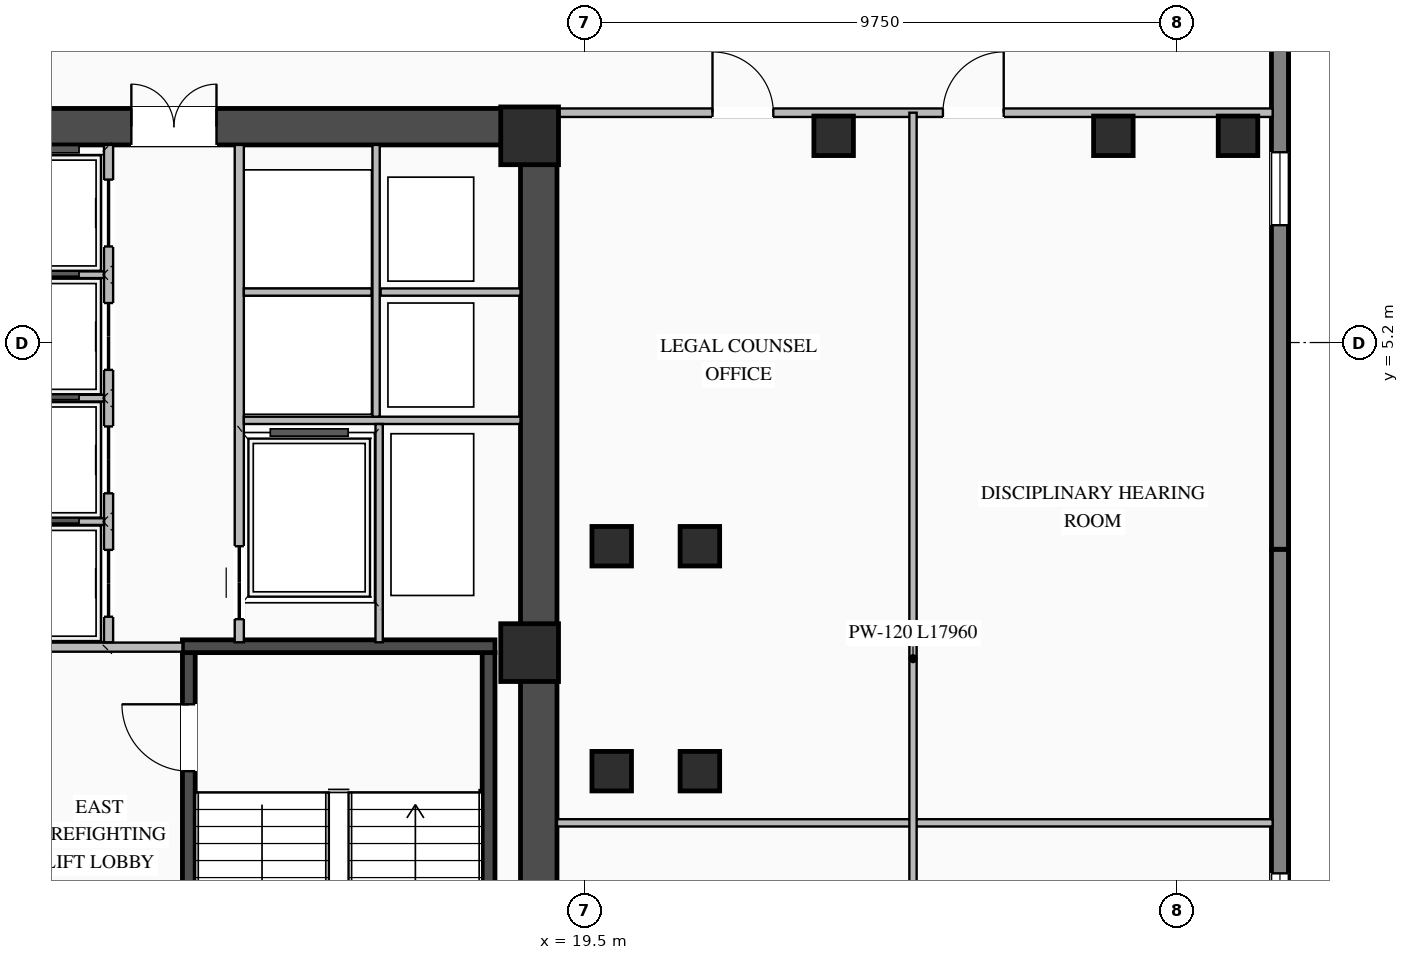
"""IFC4 building model, lengths in metres.
Left out: names, types, materials, properties, quantities, classifications, styles, units other than length and angle.
Written with IfcOpenShell. Run it as: python <this file> out.ifc"""

import sys

from ifc_helpers import new_model, si_unit, direction, frame, frame_2d, origin, origin_2d, place, context, subcontext, project, spatial, rectangle, i_section, extrude, element, fill, save


model = new_model("IFC4")
c1 = context("Model", 3, precision=1e-05, world=origin(), true_north=direction((0.0, 1.0)))
c2 = subcontext(c1, "Body", "Model", "MODEL_VIEW")
j1 = project(units=[si_unit("LENGTHUNIT", "METRE"), si_unit("PLANEANGLEUNIT", "RADIAN")], contexts=[c1])
p1 = place(None, origin())
s1 = spatial("IfcSite", under=j1, at=p1, CompositionType="ELEMENT")
p2 = place(p1, origin())
s2 = spatial("IfcBuilding", under=s1, at=p2, CompositionType="ELEMENT")
p3 = place(p2, frame((0.0, 0.0, 120.85)))
s3 = spatial("IfcBuildingStorey", under=s2, at=p3, CompositionType="ELEMENT", Elevation=120.85)
p4 = place(p3, frame((8.8, 8.75, 0.0), z_axis=(0.0, 0.0, 1.0), x_axis=(1.0, 0.0, 0.0)))
e1 = element("IfcWall", 1, at=p4, inside=s3, PredefinedType="SHEAR", context=c2, shape_type="SweptSolid", body=[
    extrude(rectangle(XDim=10.25, YDim=0.6, at=frame_2d((5.125, 0.0))), origin(), (0.0, 0.0, 1.0), 3.27),
])
p5 = place(p4, frame((3.25, 0.0, 0.0)))
e2 = element("IfcOpeningElement", 2, at=p5, cuts=e1, PredefinedType="OPENING", context=c2, shape_type="SweptSolid", body=[
    extrude(rectangle(XDim=1.4, YDim=2.05, at=frame_2d((0.7, 1.025))), frame((0.0, 0.31, 0.0), z_axis=(0.0, -1.0, 0.0), x_axis=(1.0, 0.0, 0.0)), (0.0, 0.0, 1.0), 0.62),
])
p6 = place(p3, frame((18.75, -8.45, 0.0), z_axis=(0.0, 0.0, 1.0), x_axis=(0.0, 1.0, 0.0)))
e3 = element("IfcWall", 3, at=p6, inside=s3, PredefinedType="SHEAR", context=c2, shape_type="SweptSolid", body=[
    extrude(rectangle(XDim=16.9, YDim=0.6, at=frame_2d((8.45, 0.0))), origin(), (0.0, 0.0, 1.0), 3.27),
])
p7 = place(p3, frame((12.995, -8.1, 0.0), z_axis=(0.0, 0.0, 1.0), x_axis=(0.0, 1.0, 0.0)))
e4 = element("IfcWall", 4, at=p7, inside=s3, PredefinedType="SHEAR", context=c2, shape_type="SweptSolid", body=[
    extrude(rectangle(XDim=8.2, YDim=0.21, at=frame_2d((4.1, 0.0))), origin(), (0.0, 0.0, 1.0), 3.27),
])
p8 = place(p7, frame((6.25, 0.0, 0.0)))
e5 = element("IfcOpeningElement", 5, at=p8, cuts=e4, PredefinedType="OPENING", context=c2, shape_type="SweptSolid", body=[
    extrude(rectangle(XDim=1.1, YDim=2.15, at=frame_2d((0.55, 1.075))), frame((0.0, 0.115, 0.0), z_axis=(0.0, -1.0, 0.0), x_axis=(1.0, 0.0, 0.0)), (0.0, 0.0, 1.0), 0.23),
])
p9 = place(p3, frame((17.925, -8.1, 0.0), z_axis=(0.0, 0.0, 1.0), x_axis=(0.0, 1.0, 0.0)))
e6 = element("IfcWall", 6, at=p9, inside=s3, PredefinedType="SHEAR", context=c2, shape_type="SweptSolid", body=[
    extrude(rectangle(XDim=8.2, YDim=0.21, at=frame_2d((4.1, 0.0))), origin(), (0.0, 0.0, 1.0), 3.27),
])
p10 = place(p3, frame((18.03, 0.205, 0.0), z_axis=(0.0, 0.0, 1.0), x_axis=(-1.0, 0.0, 0.0)))
e7 = element("IfcWall", 7, at=p10, inside=s3, PredefinedType="SHEAR", context=c2, shape_type="SweptSolid", body=[
    extrude(rectangle(XDim=5.14, YDim=0.21, at=frame_2d((2.57, 0.0))), origin(), (0.0, 0.0, 1.0), 3.27),
])
for number, where, z_axis, x_axis in (
    (8, (18.6, 0.1, 0.0), (0.0, 0.0, 1.0), (1.0, 0.0, 0.0)),
    (9, (18.6, 8.6, 0.0), (0.0, 0.0, 1.0), (1.0, 0.0, 0.0)),
):
    element("IfcColumn", number, at=place(p3, frame(where, z_axis=z_axis, x_axis=x_axis)), inside=s3, PredefinedType="COLUMN", context=c2, shape_type="SweptSolid", body=[
        extrude(rectangle(XDim=0.95, YDim=0.95, at=origin_2d()), origin(), (0.0, 0.0, 1.0), 3.45),
    ])
for number, where, z_axis, x_axis in (
    (10, (19.95, -1.85, 0.0), (0.0, 0.0, 1.0), (1.0, 0.0, 0.0)),
    (11, (19.95, 1.85, 0.0), (0.0, 0.0, 1.0), (1.0, 0.0, 0.0)),
    (12, (21.4, -1.85, 0.0), (0.0, 0.0, 1.0), (1.0, 0.0, 0.0)),
    (13, (21.4, 1.85, 0.0), (0.0, 0.0, 1.0), (1.0, 0.0, 0.0)),
    (14, (23.6, 8.6, 0.0), (0.0, 0.0, 1.0), (1.0, 0.0, 0.0)),
    (15, (28.2, 8.6, 0.0), (0.0, 0.0, 1.0), (1.0, 0.0, 0.0)),
    (16, (30.25, 8.6, 0.0), (0.0, 0.0, 1.0), (1.0, 0.0, 0.0)),
):
    element("IfcColumn", number, at=place(p3, frame(where, z_axis=z_axis, x_axis=x_axis)), inside=s3, PredefinedType="COLUMN", context=c2, shape_type="SweptSolid", body=[
        extrude(i_section(OverallWidth=0.65, OverallDepth=0.65, WebThickness=0.028, FlangeThickness=0.04, at=origin_2d()), origin(), (0.0, 0.0, 1.0), 3.45),
    ])
p11 = place(p3, frame((30.94, 1.8, 0.0), z_axis=(0.0, 0.0, 1.0), x_axis=(0.0, -1.0, 0.0)))
e17 = element("IfcWall", 17, at=p11, inside=s3, PredefinedType="STANDARD", context=c2, shape_type="SweptSolid", body=[
    extrude(rectangle(XDim=17.79, YDim=0.28, at=frame_2d((8.895, 0.0))), origin(), (0.0, 0.0, 1.0), 3.25),
])
p12 = place(p11, frame((5.33, 0.0, 0.76)))
e18 = element("IfcOpeningElement", 18, at=p12, cuts=e17, PredefinedType="OPENING", context=c2, shape_type="SweptSolid", body=[
    extrude(rectangle(XDim=1.2, YDim=1.95, at=frame_2d((0.6, 0.975))), frame((0.0, 0.15, 0.0), z_axis=(0.0, -1.0, 0.0), x_axis=(1.0, 0.0, 0.0)), (0.0, 0.0, 1.0), 0.3),
])
p13 = place(p11, frame((11.26, 0.0, 0.76)))
e19 = element("IfcOpeningElement", 19, at=p13, cuts=e17, PredefinedType="OPENING", context=c2, shape_type="SweptSolid", body=[
    extrude(rectangle(XDim=1.2, YDim=1.95, at=frame_2d((0.6, 0.975))), frame((0.0, 0.15, 0.0), z_axis=(0.0, -1.0, 0.0), x_axis=(1.0, 0.0, 0.0)), (0.0, 0.0, 1.0), 0.3),
])
p14 = place(p3, frame((30.94, 19.59, 0.0), z_axis=(0.0, 0.0, 1.0), x_axis=(0.0, -1.0, 0.0)))
e20 = element("IfcWall", 20, at=p14, inside=s3, PredefinedType="STANDARD", context=c2, shape_type="SweptSolid", body=[
    extrude(rectangle(XDim=17.79, YDim=0.28, at=frame_2d((8.895, 0.0))), origin(), (0.0, 0.0, 1.0), 3.25),
])
p15 = place(p14, frame((5.33, 0.0, 0.76)))
e21 = element("IfcOpeningElement", 21, at=p15, cuts=e20, PredefinedType="OPENING", context=c2, shape_type="SweptSolid", body=[
    extrude(rectangle(XDim=1.2, YDim=1.95, at=frame_2d((0.6, 0.975))), frame((0.0, 0.15, 0.0), z_axis=(0.0, -1.0, 0.0), x_axis=(1.0, 0.0, 0.0)), (0.0, 0.0, 1.0), 0.3),
])
p16 = place(p14, frame((11.26, 0.0, 0.76)))
e22 = element("IfcOpeningElement", 22, at=p16, cuts=e20, PredefinedType="OPENING", context=c2, shape_type="SweptSolid", body=[
    extrude(rectangle(XDim=1.2, YDim=1.95, at=frame_2d((0.6, 0.975))), frame((0.0, 0.15, 0.0), z_axis=(0.0, -1.0, 0.0), x_axis=(1.0, 0.0, 0.0)), (0.0, 0.0, 1.0), 0.3),
])
p17 = place(p3, frame((9.4, 0.19, 0.0), z_axis=(0.0, 0.0, 1.0), x_axis=(1.0, 0.0, 0.0)))
e23 = element("IfcWall", 23, at=p17, inside=s3, PredefinedType="STANDARD", context=c2, shape_type="SweptSolid", body=[
    extrude(rectangle(XDim=3.49, YDim=0.15, at=frame_2d((1.745, 0.0))), origin(), (0.0, 0.0, 1.0), 2.645),
])
p18 = place(p3, frame((11.675, 0.27, 0.0), z_axis=(0.0, 0.0, 1.0), x_axis=(0.0, 1.0, 0.0)))
e24 = element("IfcWall", 24, at=p18, inside=s3, PredefinedType="STANDARD", context=c2, shape_type="SweptSolid", body=[
    extrude(rectangle(XDim=8.18, YDim=0.15, at=frame_2d((4.09, 0.0))), origin(), (0.0, 0.0, 1.0), 3.25),
])
p19 = place(p18, frame((0.42, 0.0, 0.0)))
e25 = element("IfcOpeningElement", 25, at=p19, cuts=e24, PredefinedType="OPENING", context=c2, shape_type="SweptSolid", body=[
    extrude(rectangle(XDim=1.1, YDim=2.1, at=frame_2d((0.55, 1.05))), frame((0.0, 0.085, 0.0), z_axis=(0.0, -1.0, 0.0), x_axis=(1.0, 0.0, 0.0)), (0.0, 0.0, 1.0), 0.17),
])
p20 = place(p18, frame((2.45, 0.0, 0.0)))
e26 = element("IfcOpeningElement", 26, at=p20, cuts=e24, PredefinedType="OPENING", context=c2, shape_type="SweptSolid", body=[
    extrude(rectangle(XDim=1.1, YDim=2.1, at=frame_2d((0.55, 1.05))), frame((0.0, 0.085, 0.0), z_axis=(0.0, -1.0, 0.0), x_axis=(1.0, 0.0, 0.0)), (0.0, 0.0, 1.0), 0.17),
])
p21 = place(p18, frame((4.48, 0.0, 0.0)))
e27 = element("IfcOpeningElement", 27, at=p21, cuts=e24, PredefinedType="OPENING", context=c2, shape_type="SweptSolid", body=[
    extrude(rectangle(XDim=1.1, YDim=2.1, at=frame_2d((0.55, 1.05))), frame((0.0, 0.085, 0.0), z_axis=(0.0, -1.0, 0.0), x_axis=(1.0, 0.0, 0.0)), (0.0, 0.0, 1.0), 0.17),
])
p22 = place(p18, frame((6.51, 0.0, 0.0)))
e28 = element("IfcOpeningElement", 28, at=p22, cuts=e24, PredefinedType="OPENING", context=c2, shape_type="SweptSolid", body=[
    extrude(rectangle(XDim=1.1, YDim=2.1, at=frame_2d((0.55, 1.05))), frame((0.0, 0.085, 0.0), z_axis=(0.0, -1.0, 0.0), x_axis=(1.0, 0.0, 0.0)), (0.0, 0.0, 1.0), 0.17),
])
for number, where, z_axis, x_axis in (
    (29, (9.4, 2.255, 0.0), (0.0, 0.0, 1.0), (1.0, 0.0, 0.0)),
    (30, (9.4, 4.285, 0.0), (0.0, 0.0, 1.0), (1.0, 0.0, 0.0)),
    (31, (9.4, 6.315, 0.0), (0.0, 0.0, 1.0), (1.0, 0.0, 0.0)),
):
    element("IfcWall", number, at=place(p3, frame(where, z_axis=z_axis, x_axis=x_axis)), inside=s3, PredefinedType="STANDARD", context=c2, shape_type="SweptSolid", body=[
        extrude(rectangle(XDim=2.2, YDim=0.11, at=frame_2d((1.1, 0.0))), origin(), (0.0, 0.0, 1.0), 3.25),
    ])
p23 = place(p3, frame((13.825, 0.27, 0.0), z_axis=(0.0, 0.0, 1.0), x_axis=(0.0, 1.0, 0.0)))
e32 = element("IfcWall", 32, at=p23, inside=s3, PredefinedType="STANDARD", context=c2, shape_type="SweptSolid", body=[
    extrude(rectangle(XDim=8.18, YDim=0.15, at=frame_2d((4.09, 0.0))), origin(), (0.0, 0.0, 1.0), 3.25),
])
p24 = place(p23, frame((0.38, 0.0, 0.0)))
e33 = element("IfcOpeningElement", 33, at=p24, cuts=e32, PredefinedType="OPENING", context=c2, shape_type="SweptSolid", body=[
    extrude(rectangle(XDim=1.2, YDim=2.1, at=frame_2d((0.6, 1.05))), frame((0.0, 0.085, 0.0), z_axis=(0.0, -1.0, 0.0), x_axis=(1.0, 0.0, 0.0)), (0.0, 0.0, 1.0), 0.17),
])
p25 = place(p3, frame((13.9, 3.92, 0.0), z_axis=(0.0, 0.0, 1.0), x_axis=(1.0, 0.0, 0.0)))
e34 = element("IfcWall", 34, at=p25, inside=s3, PredefinedType="STANDARD", context=c2, shape_type="SweptSolid", body=[
    extrude(rectangle(XDim=4.55, YDim=0.12, at=frame_2d((2.275, 0.0))), origin(), (0.0, 0.0, 1.0), 3.25),
])
p26 = place(p3, frame((16.15, 6.03, 0.0), z_axis=(0.0, 0.0, 1.0), x_axis=(1.0, 0.0, 0.0)))
e35 = element("IfcWall", 35, at=p26, inside=s3, PredefinedType="STANDARD", context=c2, shape_type="SweptSolid", body=[
    extrude(rectangle(XDim=2.3, YDim=0.12, at=frame_2d((1.15, 0.0))), origin(), (0.0, 0.0, 1.0), 3.25),
])
p27 = place(p3, frame((16.075, 3.98, 0.0), z_axis=(0.0, 0.0, 1.0), x_axis=(0.0, 1.0, 0.0)))
e36 = element("IfcWall", 36, at=p27, inside=s3, PredefinedType="STANDARD", context=c2, shape_type="SweptSolid", body=[
    extrude(rectangle(XDim=4.47, YDim=0.12, at=frame_2d((2.235, 0.0))), origin(), (0.0, 0.0, 1.0), 3.25),
])
p28 = place(p3, frame((13.9, 6.03, 0.0), z_axis=(0.0, 0.0, 1.0), x_axis=(1.0, 0.0, 0.0)))
e37 = element("IfcWall", 37, at=p28, inside=s3, PredefinedType="STANDARD", context=c2, shape_type="SweptSolid", body=[
    extrude(rectangle(XDim=2.1, YDim=0.12, at=frame_2d((1.05, 0.0))), origin(), (0.0, 0.0, 1.0), 3.25),
])
p29 = place(p3, frame((16.125, 0.27, 0.0), z_axis=(0.0, 0.0, 1.0), x_axis=(0.0, 1.0, 0.0)))
e38 = element("IfcWall", 38, at=p29, inside=s3, PredefinedType="STANDARD", context=c2, shape_type="SweptSolid", body=[
    extrude(rectangle(XDim=3.59, YDim=0.12, at=frame_2d((1.795, 0.0))), origin(), (0.0, 0.0, 1.0), 3.25),
])
p30 = place(p3, frame((19.05, 8.98, 0.0), z_axis=(0.0, 0.0, 1.0), x_axis=(1.0, 0.0, 0.0)))
e39 = element("IfcWall", 39, at=p30, inside=s3, PredefinedType="STANDARD", context=c2, shape_type="SweptSolid", body=[
    extrude(rectangle(XDim=11.77, YDim=0.14, at=frame_2d((5.885, 0.0))), origin(), (0.0, 0.0, 1.0), 3.25),
])
p31 = place(p30, frame((2.558, 0.0, 0.0)))
e40 = element("IfcOpeningElement", 40, at=p31, cuts=e39, PredefinedType="OPENING", context=c2, shape_type="SweptSolid", body=[
    extrude(rectangle(XDim=1.0, YDim=2.08, at=frame_2d((0.5, 1.04))), frame((0.0, 0.08, 0.0), z_axis=(0.0, -1.0, 0.0), x_axis=(1.0, 0.0, 0.0)), (0.0, 0.0, 1.0), 0.16),
])
p32 = place(p30, frame((6.347, 0.0, 0.0)))
e41 = element("IfcOpeningElement", 41, at=p32, cuts=e39, PredefinedType="OPENING", context=c2, shape_type="SweptSolid", body=[
    extrude(rectangle(XDim=1.0, YDim=2.08, at=frame_2d((0.5, 1.04))), frame((0.0, 0.08, 0.0), z_axis=(0.0, -1.0, 0.0), x_axis=(1.0, 0.0, 0.0)), (0.0, 0.0, 1.0), 0.16),
])
p33 = place(p3, frame((19.05, -2.7, 0.0), z_axis=(0.0, 0.0, 1.0), x_axis=(1.0, 0.0, 0.0)))
e42 = element("IfcWall", 42, at=p33, inside=s3, PredefinedType="STANDARD", context=c2, shape_type="SweptSolid", body=[
    extrude(rectangle(XDim=11.77, YDim=0.12, at=frame_2d((5.885, 0.0))), origin(), (0.0, 0.0, 1.0), 3.25),
])
p34 = place(p3, frame((24.905, -8.98, 0.0), z_axis=(0.0, 0.0, 1.0), x_axis=(0.0, 1.0, 0.0)))
e43 = element("IfcWall", 43, at=p34, inside=s3, PredefinedType="STANDARD", context=c2, shape_type="SweptSolid", body=[
    extrude(rectangle(XDim=17.96, YDim=0.12, at=frame_2d((8.98, 0.0))), origin(), (0.0, 0.0, 1.0), 3.25),
])
p35 = place(p12, origin())
e44 = element("IfcWindow", 44, at=p35, inside=s3, PartitioningType="SINGLE_PANEL", PredefinedType="WINDOW", context=c2, shape_type="SweptSolid", body=[
    extrude(rectangle(XDim=1.2, YDim=1.95, at=frame_2d((0.6, 0.975))), frame((0.0, 0.03, 0.0), z_axis=(0.0, -1.0, 0.0), x_axis=(1.0, 0.0, 0.0)), (0.0, 0.0, 1.0), 0.06),
])
fill(e18, e44)
p36 = place(p16, origin())
e45 = element("IfcWindow", 45, at=p36, inside=s3, PartitioningType="SINGLE_PANEL", PredefinedType="WINDOW", context=c2, shape_type="SweptSolid", body=[
    extrude(rectangle(XDim=1.2, YDim=1.95, at=frame_2d((0.6, 0.975))), frame((0.0, 0.03, 0.0), z_axis=(0.0, -1.0, 0.0), x_axis=(1.0, 0.0, 0.0)), (0.0, 0.0, 1.0), 0.06),
])
fill(e22, e45)
p37 = place(p8, origin())
e46 = element("IfcDoor", 46, at=p37, inside=s3, OperationType="SINGLE_SWING_RIGHT", PredefinedType="DOOR", context=c2, shape_type="SweptSolid", body=[
    extrude(rectangle(XDim=1.1, YDim=2.15, at=frame_2d((0.55, 1.075))), frame((0.0, 0.025, 0.0), z_axis=(0.0, -1.0, 0.0), x_axis=(1.0, 0.0, 0.0)), (0.0, 0.0, 1.0), 0.05),
])
fill(e5, e46)
p38 = place(p5, origin())
e47 = element("IfcDoor", 47, at=p38, inside=s3, OperationType="DOUBLE_DOOR_SINGLE_SWING", PredefinedType="DOOR", context=c2, shape_type="SweptSolid", body=[
    extrude(rectangle(XDim=1.4, YDim=2.05, at=frame_2d((0.7, 1.025))), frame((0.0, 0.245, 0.0), z_axis=(0.0, -1.0, 0.0), x_axis=(1.0, 0.0, 0.0)), (0.0, 0.0, 1.0), 0.05),
])
fill(e2, e47)
p39 = place(p19, origin())
e48 = element("IfcDoor", 48, at=p39, inside=s3, OperationType="DOUBLE_DOOR_SLIDING", PredefinedType="DOOR", context=c2, shape_type="SweptSolid", body=[
    extrude(rectangle(XDim=1.1, YDim=2.1, at=frame_2d((0.55, 1.05))), frame((0.0, 0.025, 0.0), z_axis=(0.0, -1.0, 0.0), x_axis=(1.0, 0.0, 0.0)), (0.0, 0.0, 1.0), 0.05),
])
fill(e25, e48)
p40 = place(p20, origin())
e49 = element("IfcDoor", 49, at=p40, inside=s3, OperationType="DOUBLE_DOOR_SLIDING", PredefinedType="DOOR", context=c2, shape_type="SweptSolid", body=[
    extrude(rectangle(XDim=1.1, YDim=2.1, at=frame_2d((0.55, 1.05))), frame((0.0, 0.025, 0.0), z_axis=(0.0, -1.0, 0.0), x_axis=(1.0, 0.0, 0.0)), (0.0, 0.0, 1.0), 0.05),
])
fill(e26, e49)
p41 = place(p21, origin())
e50 = element("IfcDoor", 50, at=p41, inside=s3, OperationType="DOUBLE_DOOR_SLIDING", PredefinedType="DOOR", context=c2, shape_type="SweptSolid", body=[
    extrude(rectangle(XDim=1.1, YDim=2.1, at=frame_2d((0.55, 1.05))), frame((0.0, 0.025, 0.0), z_axis=(0.0, -1.0, 0.0), x_axis=(1.0, 0.0, 0.0)), (0.0, 0.0, 1.0), 0.05),
])
fill(e27, e50)
p42 = place(p22, origin())
e51 = element("IfcDoor", 51, at=p42, inside=s3, OperationType="DOUBLE_DOOR_SLIDING", PredefinedType="DOOR", context=c2, shape_type="SweptSolid", body=[
    extrude(rectangle(XDim=1.1, YDim=2.1, at=frame_2d((0.55, 1.05))), frame((0.0, 0.025, 0.0), z_axis=(0.0, -1.0, 0.0), x_axis=(1.0, 0.0, 0.0)), (0.0, 0.0, 1.0), 0.05),
])
fill(e28, e51)
p43 = place(p24, origin())
e52 = element("IfcDoor", 52, at=p43, inside=s3, OperationType="DOUBLE_DOOR_SLIDING", PredefinedType="DOOR", context=c2, shape_type="SweptSolid", body=[
    extrude(rectangle(XDim=1.2, YDim=2.1, at=frame_2d((0.6, 1.05))), frame((0.0, 0.025, 0.0), z_axis=(0.0, -1.0, 0.0), x_axis=(1.0, 0.0, 0.0)), (0.0, 0.0, 1.0), 0.05),
])
fill(e33, e52)
p44 = place(p31, origin())
e53 = element("IfcDoor", 53, at=p44, inside=s3, OperationType="SINGLE_SWING_LEFT", PredefinedType="DOOR", context=c2, shape_type="SweptSolid", body=[
    extrude(rectangle(XDim=1.0, YDim=2.08, at=frame_2d((0.5, 1.04))), frame((0.0, 0.025, 0.0), z_axis=(0.0, -1.0, 0.0), x_axis=(1.0, 0.0, 0.0)), (0.0, 0.0, 1.0), 0.05),
])
fill(e40, e53)
p45 = place(p32, origin())
e54 = element("IfcDoor", 54, at=p45, inside=s3, OperationType="SINGLE_SWING_RIGHT", PredefinedType="DOOR", context=c2, shape_type="SweptSolid", body=[
    extrude(rectangle(XDim=1.0, YDim=2.08, at=frame_2d((0.5, 1.04))), frame((0.0, 0.025, 0.0), z_axis=(0.0, -1.0, 0.0), x_axis=(1.0, 0.0, 0.0)), (0.0, 0.0, 1.0), 0.05),
])
fill(e41, e54)
save(model, sys.argv[1])
